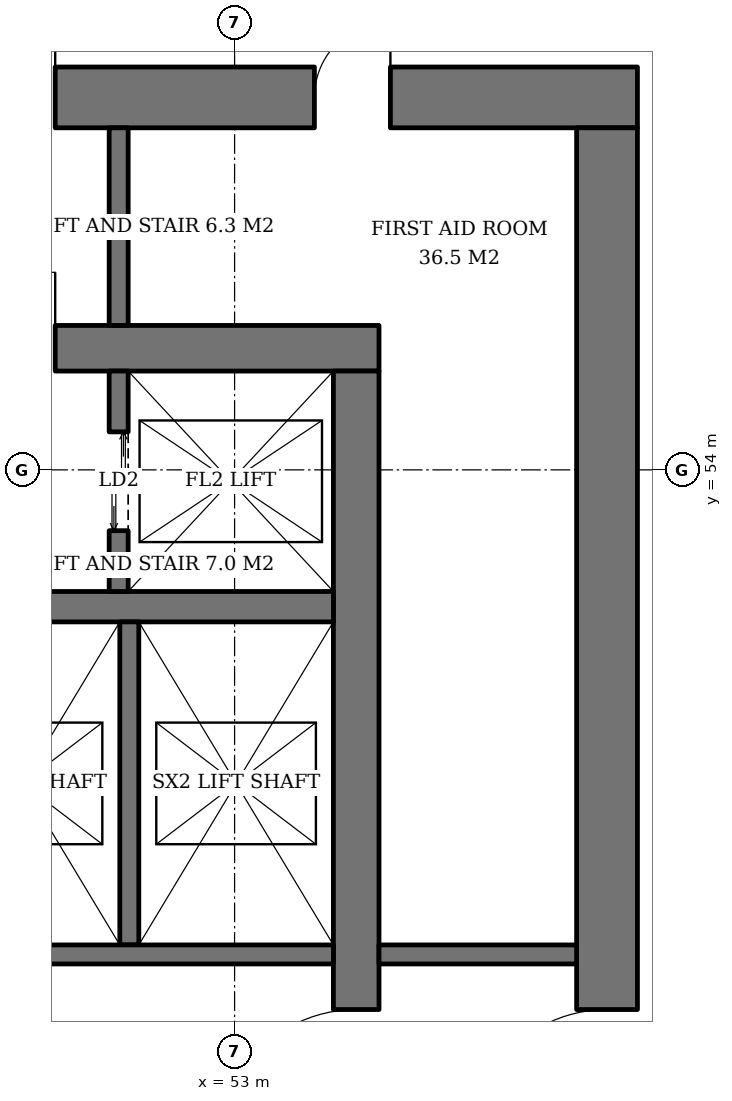
"""IFC4 building model, lengths in metres.
Left out: names, types, materials, properties, quantities, classifications, styles, units other than length and angle.
Written with IfcOpenShell. Run it as: python <this file> out.ifc"""

import sys

from ifc_helpers import new_model, si_unit, direction, frame, frame_2d, origin, place, context, subcontext, project, spatial, rectangle, extrude, element, fill, save


model = new_model("IFC4")
c1 = context("Model", 3, precision=1e-05, world=origin(), true_north=direction((0.0, 1.0)))
c2 = subcontext(c1, "Body", "Model", "MODEL_VIEW")
j1 = project(units=[si_unit("LENGTHUNIT", "METRE"), si_unit("PLANEANGLEUNIT", "RADIAN")], contexts=[c1])
p1 = place(None, origin())
s1 = spatial("IfcSite", under=j1, at=p1, CompositionType="ELEMENT")
p2 = place(p1, origin())
s2 = spatial("IfcBuilding", under=s1, at=p2, CompositionType="ELEMENT")
p3 = place(p2, frame((0.0, 0.0, 32.4)))
s3 = spatial("IfcBuildingStorey", under=s2, at=p3, CompositionType="ELEMENT", Elevation=32.4)
p4 = place(p3, frame((35.1, 55.6, 0.0), z_axis=(0.0, 0.0, 1.0), x_axis=(1.0, 0.0, 0.0)))
e1 = element("IfcWall", 1, at=p4, inside=s3, PredefinedType="SHEAR", context=c2, shape_type="SweptSolid", body=[
    extrude(rectangle(XDim=19.8, YDim=0.6, at=frame_2d((9.9, 0.0))), origin(), (0.0, 0.0, 1.0), 3.8),
])
p5 = place(p4, frame((14.54, 0.0, 0.0)))
e2 = element("IfcOpeningElement", 2, at=p5, cuts=e1, PredefinedType="OPENING", context=c2, shape_type="SweptSolid", body=[
    extrude(rectangle(XDim=1.0, YDim=2.1, at=frame_2d((0.5, 1.05))), frame((0.0, 0.31, 0.0), z_axis=(0.0, -1.0, 0.0), x_axis=(1.0, 0.0, 0.0)), (0.0, 0.0, 1.0), 0.62),
])
p6 = place(p4, frame((2.425, 0.0, 0.0)))
e3 = element("IfcOpeningElement", 3, at=p6, cuts=e1, PredefinedType="OPENING", context=c2, shape_type="SweptSolid", body=[
    extrude(rectangle(XDim=1.0, YDim=2.1, at=frame_2d((0.5, 1.05))), frame((0.0, 0.31, 0.0), z_axis=(0.0, -1.0, 0.0), x_axis=(1.0, 0.0, 0.0)), (0.0, 0.0, 1.0), 0.62),
])
p7 = place(p3, frame((54.6, 36.7, 0.0), z_axis=(0.0, 0.0, 1.0), x_axis=(0.0, 1.0, 0.0)))
e4 = element("IfcWall", 4, at=p7, inside=s3, PredefinedType="SHEAR", context=c2, shape_type="SweptSolid", body=[
    extrude(rectangle(XDim=18.6, YDim=0.6, at=frame_2d((9.3, 0.0))), origin(), (0.0, 0.0, 1.0), 3.8),
])
p8 = place(p7, frame((8.4, 0.0, 0.0)))
e5 = element("IfcOpeningElement", 5, at=p8, cuts=e4, PredefinedType="OPENING", context=c2, shape_type="SweptSolid", body=[
    extrude(rectangle(XDim=1.8, YDim=2.4, at=frame_2d((0.9, 1.2))), frame((0.0, 0.31, 0.0), z_axis=(0.0, -1.0, 0.0), x_axis=(1.0, 0.0, 0.0)), (0.0, 0.0, 1.0), 0.62),
])
p9 = place(p3, frame((31.7, 58.9, 0.0), z_axis=(0.0, 0.0, 1.0), x_axis=(1.0, 0.0, 0.0)))
e6 = element("IfcWall", 6, at=p9, inside=s3, PredefinedType="SHEAR", context=c2, shape_type="SweptSolid", body=[
    extrude(rectangle(XDim=26.6, YDim=0.8, at=frame_2d((13.3, 0.0))), origin(), (0.0, 0.0, 1.0), 3.8),
])
p10 = place(p9, frame((17.94, 0.0, 0.0)))
e7 = element("IfcOpeningElement", 7, at=p10, cuts=e6, PredefinedType="OPENING", context=c2, shape_type="SweptSolid", body=[
    extrude(rectangle(XDim=1.0, YDim=2.1, at=frame_2d((0.5, 1.05))), frame((0.0, 0.41, 0.0), z_axis=(0.0, -1.0, 0.0), x_axis=(1.0, 0.0, 0.0)), (0.0, 0.0, 1.0), 0.82),
])
p11 = place(p9, frame((5.825, 0.0, 0.0)))
e8 = element("IfcOpeningElement", 8, at=p11, cuts=e6, PredefinedType="OPENING", context=c2, shape_type="SweptSolid", body=[
    extrude(rectangle(XDim=1.0, YDim=2.1, at=frame_2d((0.5, 1.05))), frame((0.0, 0.41, 0.0), z_axis=(0.0, -1.0, 0.0), x_axis=(1.0, 0.0, 0.0)), (0.0, 0.0, 1.0), 0.82),
])
p12 = place(p9, frame((1.139, 0.0, 0.0)))
e9 = element("IfcOpeningElement", 9, at=p12, cuts=e6, PredefinedType="OPENING", context=c2, shape_type="SweptSolid", body=[
    extrude(rectangle(XDim=1.0, YDim=2.1, at=frame_2d((0.5, 1.05))), frame((0.0, 0.41, 0.0), z_axis=(0.0, -1.0, 0.0), x_axis=(1.0, 0.0, 0.0)), (0.0, 0.0, 1.0), 0.82),
])
p13 = place(p9, frame((2.661, 0.0, 0.0)))
e10 = element("IfcOpeningElement", 10, at=p13, cuts=e6, PredefinedType="OPENING", context=c2, shape_type="SweptSolid", body=[
    extrude(rectangle(XDim=1.0, YDim=2.1, at=frame_2d((0.5, 1.05))), frame((0.0, 0.41, 0.0), z_axis=(0.0, -1.0, 0.0), x_axis=(1.0, 0.0, 0.0)), (0.0, 0.0, 1.0), 0.82),
])
p14 = place(p9, frame((4.204, 0.0, 0.0)))
e11 = element("IfcOpeningElement", 11, at=p14, cuts=e6, PredefinedType="OPENING", context=c2, shape_type="SweptSolid", body=[
    extrude(rectangle(XDim=1.0, YDim=2.1, at=frame_2d((0.5, 1.05))), frame((0.0, 0.41, 0.0), z_axis=(0.0, -1.0, 0.0), x_axis=(1.0, 0.0, 0.0)), (0.0, 0.0, 1.0), 0.82),
])
p15 = place(p9, frame((9.126, 0.0, 0.0)))
e12 = element("IfcOpeningElement", 12, at=p15, cuts=e6, PredefinedType="OPENING", context=c2, shape_type="SweptSolid", body=[
    extrude(rectangle(XDim=1.0, YDim=2.1, at=frame_2d((0.5, 1.05))), frame((0.0, 0.41, 0.0), z_axis=(0.0, -1.0, 0.0), x_axis=(1.0, 0.0, 0.0)), (0.0, 0.0, 1.0), 0.82),
])
p16 = place(p9, frame((14.029, 0.0, 0.0)))
e13 = element("IfcOpeningElement", 13, at=p16, cuts=e6, PredefinedType="OPENING", context=c2, shape_type="SweptSolid", body=[
    extrude(rectangle(XDim=1.0, YDim=2.1, at=frame_2d((0.5, 1.05))), frame((0.0, 0.41, 0.0), z_axis=(0.0, -1.0, 0.0), x_axis=(1.0, 0.0, 0.0)), (0.0, 0.0, 1.0), 0.82),
])
p17 = place(p9, frame((22.35, 0.0, 0.0)))
e14 = element("IfcOpeningElement", 14, at=p17, cuts=e6, PredefinedType="OPENING", context=c2, shape_type="SweptSolid", body=[
    extrude(rectangle(XDim=1.0, YDim=2.1, at=frame_2d((0.5, 1.05))), frame((0.0, 0.41, 0.0), z_axis=(0.0, -1.0, 0.0), x_axis=(1.0, 0.0, 0.0)), (0.0, 0.0, 1.0), 0.82),
])
p18 = place(p3, frame((57.9, 33.5, 0.0), z_axis=(0.0, 0.0, 1.0), x_axis=(0.0, 1.0, 0.0)))
e15 = element("IfcWall", 15, at=p18, inside=s3, PredefinedType="SHEAR", context=c2, shape_type="SweptSolid", body=[
    extrude(rectangle(XDim=25.0, YDim=0.8, at=frame_2d((12.5, 0.0))), origin(), (0.0, 0.0, 1.0), 3.8),
])
p19 = place(p18, frame((11.6, 0.0, 0.0)))
e16 = element("IfcOpeningElement", 16, at=p19, cuts=e15, PredefinedType="OPENING", context=c2, shape_type="SweptSolid", body=[
    extrude(rectangle(XDim=1.8, YDim=2.4, at=frame_2d((0.9, 1.2))), frame((0.0, 0.41, 0.0), z_axis=(0.0, -1.0, 0.0), x_axis=(1.0, 0.0, 0.0)), (0.0, 0.0, 1.0), 0.82),
])
p20 = place(p3, frame((35.7, 52.2, 0.0), z_axis=(0.0, 0.0, 1.0), x_axis=(1.0, 0.0, 0.0)))
e17 = element("IfcWall", 17, at=p20, inside=s3, PredefinedType="SHEAR", context=c2, shape_type="SweptSolid", body=[
    extrude(rectangle(XDim=18.6, YDim=0.4, at=frame_2d((9.3, 0.0))), origin(), (0.0, 0.0, 1.0), 3.8),
])
p21 = place(p3, frame((51.475, 52.4, 0.0), z_axis=(0.0, 0.0, 1.0), x_axis=(0.0, 1.0, 0.0)))
e18 = element("IfcWall", 18, at=p21, inside=s3, PredefinedType="SHEAR", context=c2, shape_type="SweptSolid", body=[
    extrude(rectangle(XDim=2.9, YDim=0.25, at=frame_2d((1.45, 0.0))), origin(), (0.0, 0.0, 1.0), 3.8),
])
p22 = place(p21, frame((0.8, 0.0, 0.0)))
e19 = element("IfcOpeningElement", 19, at=p22, cuts=e18, PredefinedType="OPENING", context=c2, shape_type="SweptSolid", body=[
    extrude(rectangle(XDim=1.3, YDim=2.2, at=frame_2d((0.65, 1.1))), frame((0.0, 0.135, 0.0), z_axis=(0.0, -1.0, 0.0), x_axis=(1.0, 0.0, 0.0)), (0.0, 0.0, 1.0), 0.27),
])
p23 = place(p3, frame((51.615, 47.75, 0.0), z_axis=(0.0, 0.0, 1.0), x_axis=(0.0, 1.0, 0.0)))
e20 = element("IfcWall", 20, at=p23, inside=s3, PredefinedType="SHEAR", context=c2, shape_type="SweptSolid", body=[
    extrude(rectangle(XDim=4.25, YDim=0.25, at=frame_2d((2.125, 0.0))), origin(), (0.0, 0.0, 1.0), 3.8),
])
p24 = place(p3, frame((48.93, 47.625, 0.0), z_axis=(0.0, 0.0, 1.0), x_axis=(1.0, 0.0, 0.0)))
e21 = element("IfcWall", 21, at=p24, inside=s3, PredefinedType="SHEAR", context=c2, shape_type="SweptSolid", body=[
    extrude(rectangle(XDim=5.37, YDim=0.25, at=frame_2d((2.685, 0.0))), origin(), (0.0, 0.0, 1.0), 3.8),
])
for number, where, z_axis, x_axis in (
    (22, (51.475, 55.9, 0.0), (0.0, 0.0, 1.0), (0.0, 1.0, 0.0)),
    (23, (54.9, 47.625, 0.0), (0.0, 0.0, 1.0), (1.0, 0.0, 0.0)),
):
    element("IfcWall", number, at=place(p3, frame(where, z_axis=z_axis, x_axis=x_axis)), inside=s3, PredefinedType="SOLIDWALL", context=c2, shape_type="SweptSolid", body=[
        extrude(rectangle(XDim=2.6, YDim=0.25, at=frame_2d((1.3, 0.0))), origin(), (0.0, 0.0, 1.0), 3.62),
    ])
p25 = place(p22, origin())
e24 = element("IfcDoor", 24, at=p25, inside=s3, OperationType="DOUBLE_DOOR_SLIDING", PredefinedType="DOOR", context=c2, shape_type="SweptSolid", body=[
    extrude(rectangle(XDim=1.3, YDim=2.2, at=frame_2d((0.65, 1.1))), frame((0.0, 0.025, 0.0), z_axis=(0.0, -1.0, 0.0), x_axis=(1.0, 0.0, 0.0)), (0.0, 0.0, 1.0), 0.05),
])
fill(e19, e24)
p26 = place(p5, origin())
e25 = element("IfcDoor", 25, at=p26, inside=s3, OperationType="SINGLE_SWING_RIGHT", PredefinedType="DOOR", context=c2, shape_type="SweptSolid", body=[
    extrude(rectangle(XDim=1.0, YDim=2.1, at=frame_2d((0.5, 1.05))), frame((0.0, 0.025, 0.0), z_axis=(0.0, -1.0, 0.0), x_axis=(1.0, 0.0, 0.0)), (0.0, 0.0, 1.0), 0.05),
])
fill(e2, e25)
p27 = place(p8, origin())
e26 = element("IfcDoor", 26, at=p27, inside=s3, OperationType="DOUBLE_DOOR_SINGLE_SWING", PredefinedType="DOOR", context=c2, shape_type="SweptSolid", body=[
    extrude(rectangle(XDim=1.8, YDim=2.4, at=frame_2d((0.9, 1.2))), frame((0.0, 0.025, 0.0), z_axis=(0.0, -1.0, 0.0), x_axis=(1.0, 0.0, 0.0)), (0.0, 0.0, 1.0), 0.05),
])
fill(e5, e26)
p28 = place(p19, origin())
e27 = element("IfcDoor", 27, at=p28, inside=s3, OperationType="DOUBLE_DOOR_SINGLE_SWING", PredefinedType="DOOR", context=c2, shape_type="SweptSolid", body=[
    extrude(rectangle(XDim=1.8, YDim=2.4, at=frame_2d((0.9, 1.2))), frame((0.0, 0.025, 0.0), z_axis=(0.0, -1.0, 0.0), x_axis=(1.0, 0.0, 0.0)), (0.0, 0.0, 1.0), 0.05),
])
fill(e16, e27)
p29 = place(p10, origin())
e28 = element("IfcDoor", 28, at=p29, inside=s3, OperationType="SINGLE_SWING_RIGHT", PredefinedType="DOOR", context=c2, shape_type="SweptSolid", body=[
    extrude(rectangle(XDim=1.0, YDim=2.1, at=frame_2d((0.5, 1.05))), frame((0.0, 0.025, 0.0), z_axis=(0.0, -1.0, 0.0), x_axis=(1.0, 0.0, 0.0)), (0.0, 0.0, 1.0), 0.05),
])
fill(e7, e28)
p30 = place(p17, origin())
e29 = element("IfcDoor", 29, at=p30, inside=s3, OperationType="SINGLE_SWING_RIGHT", PredefinedType="DOOR", context=c2, shape_type="SweptSolid", body=[
    extrude(rectangle(XDim=1.0, YDim=2.1, at=frame_2d((0.5, 1.05))), frame((0.0, -0.34, 0.0), z_axis=(0.0, -1.0, 0.0), x_axis=(1.0, 0.0, 0.0)), (0.0, 0.0, 1.0), 0.05),
])
fill(e14, e29)
save(model, sys.argv[1])
